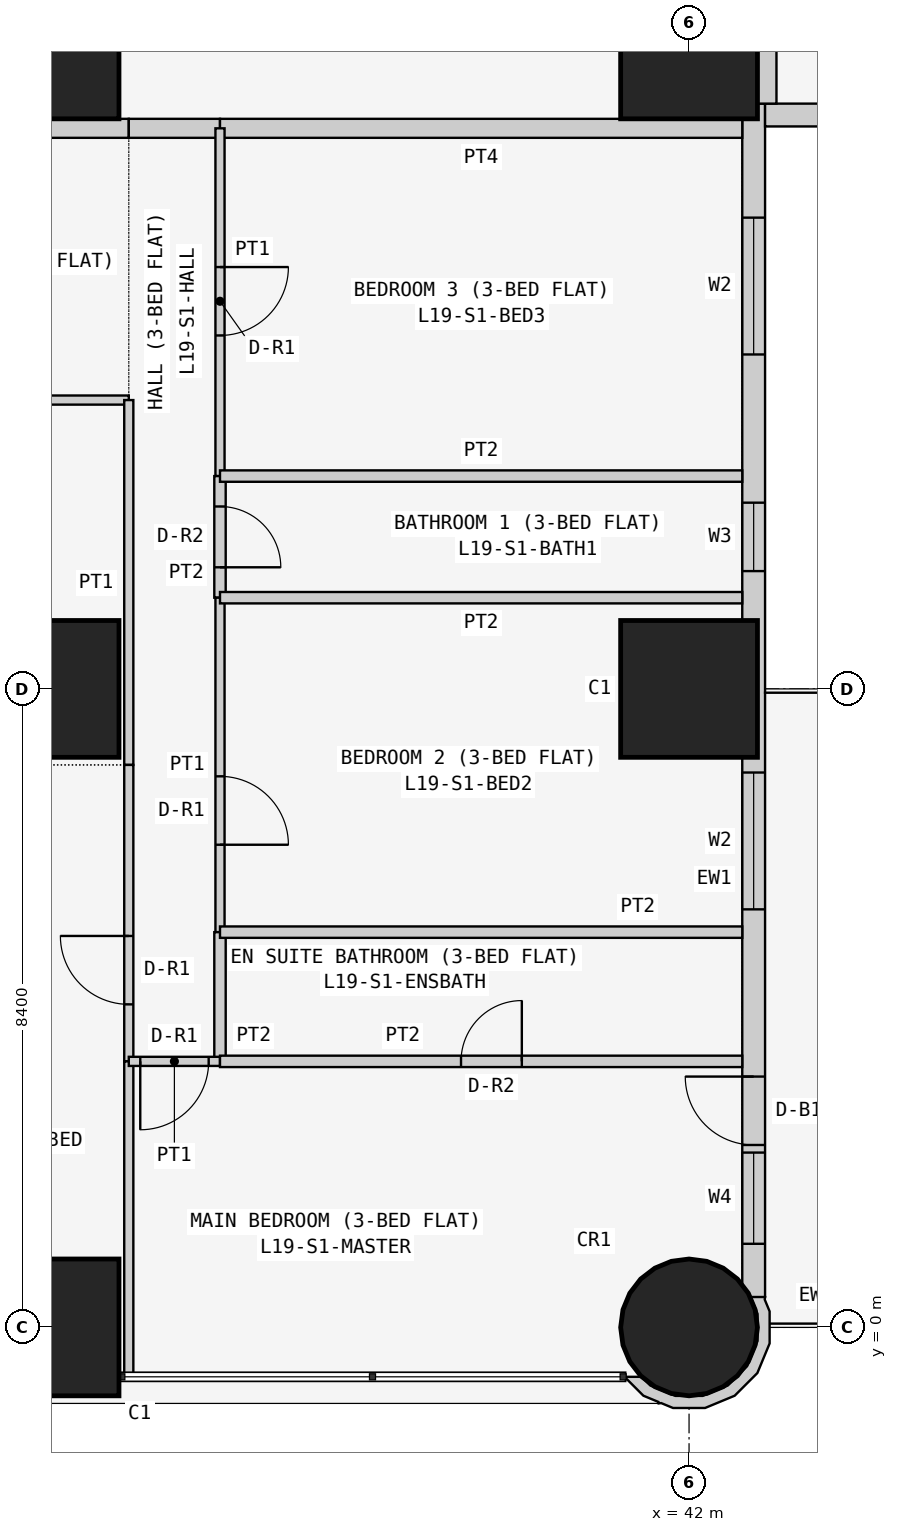
"""IFC4 building model, lengths in metres.
Left out: names, types, materials, properties, quantities, classifications, styles, units other than length and angle.
Written with IfcOpenShell. Run it as: python <this file> out.ifc"""

import sys

from ifc_helpers import new_model, si_unit, direction, frame, frame_2d, origin, origin_2d, place, context, subcontext, project, spatial, polyline, rectangle, circle, outline, extrude, element, fill, save


model = new_model("IFC4")
c1 = context("Model", 3, precision=1e-05, world=origin(), true_north=direction((0.0, 1.0)))
c2 = subcontext(c1, "Body", "Model", "MODEL_VIEW")
j1 = project(units=[si_unit("LENGTHUNIT", "METRE"), si_unit("PLANEANGLEUNIT", "RADIAN")], contexts=[c1])
p1 = place(None, origin())
s1 = spatial("IfcSite", under=j1, at=p1, CompositionType="ELEMENT")
p2 = place(p1, origin())
s2 = spatial("IfcBuilding", under=s1, at=p2, CompositionType="ELEMENT")
p3 = place(p2, frame((0.0, 0.0, 77.7)))
s3 = spatial("IfcBuildingStorey", under=s2, at=p3, CompositionType="ELEMENT", Elevation=77.7)
for number, where, z_axis, x_axis in (
    (1, (33.6, 0.0, 0.0), (0.0, 0.0, 1.0), (1.0, 0.0, 0.0)),
    (2, (33.6, 8.4, 0.0), (0.0, 0.0, 1.0), (1.0, 0.0, 0.0)),
    (3, (33.6, 16.8, 0.0), (0.0, 0.0, 1.0), (1.0, 0.0, 0.0)),
):
    element("IfcColumn", number, at=place(p3, frame(where, z_axis=z_axis, x_axis=x_axis)), inside=s3, PredefinedType="COLUMN", context=c2, shape_type="SweptSolid", body=[
        extrude(rectangle(XDim=1.8, YDim=1.8, at=origin_2d()), origin(), (0.0, 0.0, 1.0), 3.6),
    ])
p4 = place(p3, frame((42.0, 0.0, 0.0), z_axis=(0.0, 0.0, 1.0), x_axis=(1.0, 0.0, 0.0)))
e4 = element("IfcColumn", 4, at=p4, inside=s3, PredefinedType="COLUMN", context=c2, shape_type="SweptSolid", body=[
    extrude(circle(Radius=0.9, at=origin_2d()), origin(), (0.0, 0.0, 1.0), 3.6),
])
for number, where, z_axis, x_axis in (
    (5, (42.0, 8.4, 0.0), (0.0, 0.0, 1.0), (1.0, 0.0, 0.0)),
    (6, (42.0, 16.8, 0.0), (0.0, 0.0, 1.0), (1.0, 0.0, 0.0)),
):
    element("IfcColumn", number, at=place(p3, frame(where, z_axis=z_axis, x_axis=x_axis)), inside=s3, PredefinedType="COLUMN", context=c2, shape_type="SweptSolid", body=[
        extrude(rectangle(XDim=1.8, YDim=1.8, at=origin_2d()), origin(), (0.0, 0.0, 1.0), 3.6),
    ])
p5 = place(p3, frame((42.85, 0.4, 0.0), z_axis=(0.0, 0.0, 1.0), x_axis=(0.0, 1.0, 0.0)))
e7 = element("IfcWall", 7, at=p5, inside=s3, PredefinedType="SOLIDWALL", context=c2, shape_type="SweptSolid", body=[
    extrude(rectangle(XDim=15.7, YDim=0.3, at=frame_2d((7.85, 0.0))), origin(), (0.0, 0.0, 1.0), 3.45),
])
p6 = place(p5, frame((12.4, 0.0, 0.9)))
e8 = element("IfcOpeningElement", 8, at=p6, cuts=e7, PredefinedType="OPENING", context=c2, shape_type="SweptSolid", body=[
    extrude(rectangle(XDim=1.8, YDim=1.5, at=frame_2d((0.9, 0.75))), frame((0.0, 0.16, 0.0), z_axis=(0.0, -1.0, 0.0), x_axis=(1.0, 0.0, 0.0)), (0.0, 0.0, 1.0), 0.32),
])
p7 = place(p5, frame((9.55, 0.0, 1.5)))
e9 = element("IfcOpeningElement", 9, at=p7, cuts=e7, PredefinedType="OPENING", context=c2, shape_type="SweptSolid", body=[
    extrude(rectangle(XDim=0.9, YDim=0.7, at=frame_2d((0.45, 0.35))), frame((0.0, 0.16, 0.0), z_axis=(0.0, -1.0, 0.0), x_axis=(1.0, 0.0, 0.0)), (0.0, 0.0, 1.0), 0.32),
])
p8 = place(p5, frame((5.1, 0.0, 0.9)))
e10 = element("IfcOpeningElement", 10, at=p8, cuts=e7, PredefinedType="OPENING", context=c2, shape_type="SweptSolid", body=[
    extrude(rectangle(XDim=1.8, YDim=1.5, at=frame_2d((0.9, 0.75))), frame((0.0, 0.16, 0.0), z_axis=(0.0, -1.0, 0.0), x_axis=(1.0, 0.0, 0.0)), (0.0, 0.0, 1.0), 0.32),
])
p9 = place(p5, frame((2.0, 0.0, 0.0)))
e11 = element("IfcOpeningElement", 11, at=p9, cuts=e7, PredefinedType="OPENING", context=c2, shape_type="SweptSolid", body=[
    extrude(rectangle(XDim=0.9, YDim=2.4, at=frame_2d((0.45, 1.2))), frame((0.0, 0.16, 0.0), z_axis=(0.0, -1.0, 0.0), x_axis=(1.0, 0.0, 0.0)), (0.0, 0.0, 1.0), 0.32),
])
p10 = place(p5, frame((0.7, 0.0, 0.9)))
e12 = element("IfcOpeningElement", 12, at=p10, cuts=e7, PredefinedType="OPENING", context=c2, shape_type="SweptSolid", body=[
    extrude(rectangle(XDim=1.2, YDim=1.5, at=frame_2d((0.6, 0.75))), frame((0.0, 0.16, 0.0), z_axis=(0.0, -1.0, 0.0), x_axis=(1.0, 0.0, 0.0)), (0.0, 0.0, 1.0), 0.32),
])
p11 = place(p3, frame((43.0, 15.95, 0.0), z_axis=(0.0, 0.0, 1.0), x_axis=(1.0, 0.0, 0.0)))
e13 = element("IfcWall", 13, at=p11, inside=s3, PredefinedType="SOLIDWALL", context=c2, shape_type="SweptSolid", body=[
    extrude(rectangle(XDim=15.4, YDim=0.3, at=frame_2d((7.7, 0.0))), origin(), (0.0, 0.0, 1.0), 3.45),
])
p12 = place(p11, frame((1.2, 0.0, 0.9)))
e14 = element("IfcOpeningElement", 14, at=p12, cuts=e13, PredefinedType="OPENING", context=c2, shape_type="SweptSolid", body=[
    extrude(rectangle(XDim=1.8, YDim=1.5, at=frame_2d((0.9, 0.75))), frame((0.0, 0.16, 0.0), z_axis=(0.0, -1.0, 0.0), x_axis=(1.0, 0.0, 0.0)), (0.0, 0.0, 1.0), 0.32),
])
p13 = place(p11, frame((4.95, 0.0, 1.5)))
e15 = element("IfcOpeningElement", 15, at=p13, cuts=e13, PredefinedType="OPENING", context=c2, shape_type="SweptSolid", body=[
    extrude(rectangle(XDim=0.9, YDim=0.7, at=frame_2d((0.45, 0.35))), frame((0.0, 0.16, 0.0), z_axis=(0.0, -1.0, 0.0), x_axis=(1.0, 0.0, 0.0)), (0.0, 0.0, 1.0), 0.32),
])
p14 = place(p11, frame((8.5, 0.0, 0.9)))
e16 = element("IfcOpeningElement", 16, at=p14, cuts=e13, PredefinedType="OPENING", context=c2, shape_type="SweptSolid", body=[
    extrude(rectangle(XDim=1.8, YDim=1.5, at=frame_2d((0.9, 0.75))), frame((0.0, 0.16, 0.0), z_axis=(0.0, -1.0, 0.0), x_axis=(1.0, 0.0, 0.0)), (0.0, 0.0, 1.0), 0.32),
])
p15 = place(p11, frame((12.5, 0.0, 0.0)))
e17 = element("IfcOpeningElement", 17, at=p15, cuts=e13, PredefinedType="OPENING", context=c2, shape_type="SweptSolid", body=[
    extrude(rectangle(XDim=0.9, YDim=2.4, at=frame_2d((0.45, 1.2))), frame((0.0, 0.16, 0.0), z_axis=(0.0, -1.0, 0.0), x_axis=(1.0, 0.0, 0.0)), (0.0, 0.0, 1.0), 0.32),
])
p16 = place(p11, frame((13.5, 0.0, 0.9)))
e18 = element("IfcOpeningElement", 18, at=p16, cuts=e13, PredefinedType="OPENING", context=c2, shape_type="SweptSolid", body=[
    extrude(rectangle(XDim=1.2, YDim=1.5, at=frame_2d((0.6, 0.75))), frame((0.0, 0.16, 0.0), z_axis=(0.0, -1.0, 0.0), x_axis=(1.0, 0.0, 0.0)), (0.0, 0.0, 1.0), 0.32),
])
p17 = place(p3, frame((41.233, -0.611, 0.0), z_axis=(0.0, 0.0, 1.0), x_axis=(0.377204953059, -0.926129809145, 0.0)))
e19 = element("IfcWall", 19, at=p17, inside=s3, PredefinedType="SOLIDWALL", context=c2, shape_type="SweptSolid", body=[
    extrude(outline(polyline([(0.319, 1.843), (-0.072, 2.001), (-0.24, 2.001), (-0.269, 2.017), (-0.37, 1.841), (-0.102, 1.842), (0.23, 1.707), (0.485, 1.455), (0.624, 1.125), (0.626, 0.766), (0.49, 0.434), (0.239, 0.179), (0.09, 0.117), (0.011, -0.078), (0.024, -0.083), (0.33, 0.045), (0.48, 0.197), (0.499, 0.193), (0.508, 0.225), (0.626, 0.345), (0.785, 0.736), (0.782, 1.157), (0.619, 1.546), (0.319, 1.843)])), origin(), (0.0, 0.0, 1.0), 3.45),
])
p18 = place(p3, frame((43.025, 22.971, 0.0), z_axis=(0.0, 0.0, 1.0), x_axis=(0.0, -1.0, 0.0)))
e20 = element("IfcWall", 20, at=p18, inside=s3, PredefinedType="PARTITIONING", context=c2, shape_type="SweptSolid", body=[
    extrude(rectangle(XDim=6.871, YDim=0.25, at=frame_2d((3.436, 0.0))), origin(), (0.0, 0.0, 1.0), 3.45),
])
p19 = place(p3, frame((34.629, 15.775, 0.0), z_axis=(0.0, 0.0, 1.0), x_axis=(-1.0, 0.0, 0.0)))
e21 = element("IfcWall", 21, at=p19, inside=s3, PredefinedType="PARTITIONING", context=c2, shape_type="SweptSolid", body=[
    extrude(rectangle(XDim=5.229, YDim=0.25, at=frame_2d((2.615, 0.0))), origin(), (0.0, 0.0, 1.0), 3.45),
])
p20 = place(p19, frame((2.129, 0.0, 0.0)))
e22 = element("IfcOpeningElement", 22, at=p20, cuts=e21, PredefinedType="OPENING", context=c2, shape_type="SweptSolid", body=[
    extrude(rectangle(XDim=1.0, YDim=2.1, at=frame_2d((0.5, 1.05))), frame((0.0, 0.135, 0.0), z_axis=(0.0, -1.0, 0.0), x_axis=(1.0, 0.0, 0.0)), (0.0, 0.0, 1.0), 0.27),
])
p21 = place(p3, frame((35.829, 15.775, 0.0), z_axis=(0.0, 0.0, 1.0), x_axis=(-1.0, 0.0, 0.0)))
e23 = element("IfcWall", 23, at=p21, inside=s3, PredefinedType="PARTITIONING", context=c2, shape_type="SweptSolid", body=[
    extrude(rectangle(XDim=1.2, YDim=0.25, at=frame_2d((0.6, 0.0))), origin(), (0.0, 0.0, 1.0), 3.45),
])
p22 = place(p3, frame((42.7, 15.775, 0.0), z_axis=(0.0, 0.0, 1.0), x_axis=(-1.0, 0.0, 0.0)))
e24 = element("IfcWall", 24, at=p22, inside=s3, PredefinedType="PARTITIONING", context=c2, shape_type="SweptSolid", body=[
    extrude(rectangle(XDim=6.871, YDim=0.25, at=frame_2d((3.436, 0.0))), origin(), (0.0, 0.0, 1.0), 3.45),
])
p23 = place(p3, frame((29.4, 12.2, 0.0), z_axis=(0.0, 0.0, 1.0), x_axis=(1.0, 0.0, 0.0)))
e25 = element("IfcWall", 25, at=p23, inside=s3, PredefinedType="PARTITIONING", context=c2, shape_type="SweptSolid", body=[
    extrude(rectangle(XDim=5.229, YDim=0.12, at=frame_2d((2.615, 0.0))), origin(), (0.0, 0.0, 1.0), 3.45),
])
p24 = place(p23, frame((1.05, 0.0, 0.0)))
e26 = element("IfcOpeningElement", 26, at=p24, cuts=e25, PredefinedType="OPENING", context=c2, shape_type="SweptSolid", body=[
    extrude(rectangle(XDim=0.9, YDim=2.1, at=frame_2d((0.45, 1.05))), frame((0.0, 0.07, 0.0), z_axis=(0.0, -1.0, 0.0), x_axis=(1.0, 0.0, 0.0)), (0.0, 0.0, 1.0), 0.14),
])
p25 = place(p3, frame((34.629, 7.4, 0.0), z_axis=(0.0, 0.0, 1.0), x_axis=(0.0, 1.0, 0.0)))
e27 = element("IfcWall", 27, at=p25, inside=s3, PredefinedType="PARTITIONING", context=c2, shape_type="SweptSolid", body=[
    extrude(rectangle(XDim=4.8, YDim=0.12, at=frame_2d((2.4, 0.0))), origin(), (0.0, 0.0, 1.0), 3.45),
])
p26 = place(p3, frame((34.629, 3.5, 0.0), z_axis=(0.0, 0.0, 1.0), x_axis=(0.0, 1.0, 0.0)))
e28 = element("IfcWall", 28, at=p26, inside=s3, PredefinedType="PARTITIONING", context=c2, shape_type="SweptSolid", body=[
    extrude(rectangle(XDim=3.9, YDim=0.12, at=frame_2d((1.95, 0.0))), origin(), (0.0, 0.0, 1.0), 3.45),
])
p27 = place(p26, frame((0.75, 0.0, 0.0)))
e29 = element("IfcOpeningElement", 29, at=p27, cuts=e28, PredefinedType="OPENING", context=c2, shape_type="SweptSolid", body=[
    extrude(rectangle(XDim=0.9, YDim=2.1, at=frame_2d((0.45, 1.05))), frame((0.0, 0.07, 0.0), z_axis=(0.0, -1.0, 0.0), x_axis=(1.0, 0.0, 0.0)), (0.0, 0.0, 1.0), 0.14),
])
p28 = place(p3, frame((34.629, -0.65, 0.0), z_axis=(0.0, 0.0, 1.0), x_axis=(0.0, 1.0, 0.0)))
e30 = element("IfcWall", 30, at=p28, inside=s3, PredefinedType="PARTITIONING", context=c2, shape_type="SweptSolid", body=[
    extrude(rectangle(XDim=4.15, YDim=0.12, at=frame_2d((2.075, 0.0))), origin(), (0.0, 0.0, 1.0), 3.45),
])
p29 = place(p3, frame((35.829, 11.2, 0.0), z_axis=(0.0, 0.0, 1.0), x_axis=(0.0, 1.0, 0.0)))
e31 = element("IfcWall", 31, at=p29, inside=s3, PredefinedType="PARTITIONING", context=c2, shape_type="SweptSolid", body=[
    extrude(rectangle(XDim=4.575, YDim=0.12, at=frame_2d((2.288, 0.0))), origin(), (0.0, 0.0, 1.0), 3.45),
])
p30 = place(p29, frame((1.85, 0.0, 0.0)))
e32 = element("IfcOpeningElement", 32, at=p30, cuts=e31, PredefinedType="OPENING", context=c2, shape_type="SweptSolid", body=[
    extrude(rectangle(XDim=0.9, YDim=2.1, at=frame_2d((0.45, 1.05))), frame((0.0, 0.07, 0.0), z_axis=(0.0, -1.0, 0.0), x_axis=(1.0, 0.0, 0.0)), (0.0, 0.0, 1.0), 0.14),
])
p31 = place(p3, frame((35.829, 9.6, 0.0), z_axis=(0.0, 0.0, 1.0), x_axis=(0.0, 1.0, 0.0)))
e33 = element("IfcWall", 33, at=p31, inside=s3, PredefinedType="PARTITIONING", context=c2, shape_type="SweptSolid", body=[
    extrude(rectangle(XDim=1.6, YDim=0.15, at=frame_2d((0.8, 0.0))), origin(), (0.0, 0.0, 1.0), 3.45),
])
p32 = place(p31, frame((0.4, 0.0, 0.0)))
e34 = element("IfcOpeningElement", 34, at=p32, cuts=e33, PredefinedType="OPENING", context=c2, shape_type="SweptSolid", body=[
    extrude(rectangle(XDim=0.8, YDim=2.1, at=frame_2d((0.4, 1.05))), frame((0.0, 0.085, 0.0), z_axis=(0.0, -1.0, 0.0), x_axis=(1.0, 0.0, 0.0)), (0.0, 0.0, 1.0), 0.17),
])
p33 = place(p3, frame((35.829, 5.2, 0.0), z_axis=(0.0, 0.0, 1.0), x_axis=(0.0, 1.0, 0.0)))
e35 = element("IfcWall", 35, at=p33, inside=s3, PredefinedType="PARTITIONING", context=c2, shape_type="SweptSolid", body=[
    extrude(rectangle(XDim=4.4, YDim=0.12, at=frame_2d((2.2, 0.0))), origin(), (0.0, 0.0, 1.0), 3.45),
])
p34 = place(p33, frame((1.15, 0.0, 0.0)))
e36 = element("IfcOpeningElement", 36, at=p34, cuts=e35, PredefinedType="OPENING", context=c2, shape_type="SweptSolid", body=[
    extrude(rectangle(XDim=0.9, YDim=2.1, at=frame_2d((0.45, 1.05))), frame((0.0, 0.07, 0.0), z_axis=(0.0, -1.0, 0.0), x_axis=(1.0, 0.0, 0.0)), (0.0, 0.0, 1.0), 0.14),
])
p35 = place(p3, frame((35.829, 3.5, 0.0), z_axis=(0.0, 0.0, 1.0), x_axis=(0.0, 1.0, 0.0)))
e37 = element("IfcWall", 37, at=p35, inside=s3, PredefinedType="PARTITIONING", context=c2, shape_type="SweptSolid", body=[
    extrude(rectangle(XDim=1.7, YDim=0.15, at=frame_2d((0.85, 0.0))), origin(), (0.0, 0.0, 1.0), 3.45),
])
p36 = place(p3, frame((34.629, 3.5, 0.0), z_axis=(0.0, 0.0, 1.0), x_axis=(1.0, 0.0, 0.0)))
e38 = element("IfcWall", 38, at=p36, inside=s3, PredefinedType="PARTITIONING", context=c2, shape_type="SweptSolid", body=[
    extrude(rectangle(XDim=1.2, YDim=0.12, at=frame_2d((0.6, 0.0))), origin(), (0.0, 0.0, 1.0), 3.45),
])
p37 = place(p36, frame((0.151, 0.0, 0.0)))
e39 = element("IfcOpeningElement", 39, at=p37, cuts=e38, PredefinedType="OPENING", context=c2, shape_type="SweptSolid", body=[
    extrude(rectangle(XDim=0.9, YDim=2.1, at=frame_2d((0.45, 1.05))), frame((0.0, 0.07, 0.0), z_axis=(0.0, -1.0, 0.0), x_axis=(1.0, 0.0, 0.0)), (0.0, 0.0, 1.0), 0.14),
])
for number, where, z_axis, x_axis in (
    (40, (35.829, 11.2, 0.0), (0.0, 0.0, 1.0), (1.0, 0.0, 0.0)),
    (41, (35.829, 9.6, 0.0), (0.0, 0.0, 1.0), (1.0, 0.0, 0.0)),
    (42, (35.829, 5.2, 0.0), (0.0, 0.0, 1.0), (1.0, 0.0, 0.0)),
):
    element("IfcWall", number, at=place(p3, frame(where, z_axis=z_axis, x_axis=x_axis)), inside=s3, PredefinedType="PARTITIONING", context=c2, shape_type="SweptSolid", body=[
        extrude(rectangle(XDim=6.871, YDim=0.15, at=frame_2d((3.436, 0.0))), origin(), (0.0, 0.0, 1.0), 3.45),
    ])
p38 = place(p3, frame((35.829, 3.5, 0.0), z_axis=(0.0, 0.0, 1.0), x_axis=(1.0, 0.0, 0.0)))
e43 = element("IfcWall", 43, at=p38, inside=s3, PredefinedType="PARTITIONING", context=c2, shape_type="SweptSolid", body=[
    extrude(rectangle(XDim=6.871, YDim=0.15, at=frame_2d((3.436, 0.0))), origin(), (0.0, 0.0, 1.0), 3.45),
])
p39 = place(p38, frame((3.171, 0.0, 0.0)))
e44 = element("IfcOpeningElement", 44, at=p39, cuts=e43, PredefinedType="OPENING", context=c2, shape_type="SweptSolid", body=[
    extrude(rectangle(XDim=0.8, YDim=2.1, at=frame_2d((0.4, 1.05))), frame((0.0, 0.085, 0.0), z_axis=(0.0, -1.0, 0.0), x_axis=(1.0, 0.0, 0.0)), (0.0, 0.0, 1.0), 0.17),
])
p40 = place(p6, origin())
e45 = element("IfcWindow", 45, at=p40, inside=s3, PartitioningType="SINGLE_PANEL", PredefinedType="WINDOW", context=c2, shape_type="SweptSolid", body=[
    extrude(rectangle(XDim=1.8, YDim=1.5, at=frame_2d((0.9, 0.75))), frame((0.0, 0.03, 0.0), z_axis=(0.0, -1.0, 0.0), x_axis=(1.0, 0.0, 0.0)), (0.0, 0.0, 1.0), 0.06),
])
fill(e8, e45)
p41 = place(p7, origin())
e46 = element("IfcWindow", 46, at=p41, inside=s3, PartitioningType="SINGLE_PANEL", PredefinedType="WINDOW", context=c2, shape_type="SweptSolid", body=[
    extrude(rectangle(XDim=0.9, YDim=0.7, at=frame_2d((0.45, 0.35))), frame((0.0, 0.03, 0.0), z_axis=(0.0, -1.0, 0.0), x_axis=(1.0, 0.0, 0.0)), (0.0, 0.0, 1.0), 0.06),
])
fill(e9, e46)
p42 = place(p8, origin())
e47 = element("IfcWindow", 47, at=p42, inside=s3, PartitioningType="SINGLE_PANEL", PredefinedType="WINDOW", context=c2, shape_type="SweptSolid", body=[
    extrude(rectangle(XDim=1.8, YDim=1.5, at=frame_2d((0.9, 0.75))), frame((0.0, 0.03, 0.0), z_axis=(0.0, -1.0, 0.0), x_axis=(1.0, 0.0, 0.0)), (0.0, 0.0, 1.0), 0.06),
])
fill(e10, e47)
p43 = place(p9, origin())
e48 = element("IfcDoor", 48, at=p43, inside=s3, OperationType="SINGLE_SWING_RIGHT", PredefinedType="DOOR", context=c2, shape_type="SweptSolid", body=[
    extrude(rectangle(XDim=0.9, YDim=2.4, at=frame_2d((0.45, 1.2))), frame((0.0, 0.025, 0.0), z_axis=(0.0, -1.0, 0.0), x_axis=(1.0, 0.0, 0.0)), (0.0, 0.0, 1.0), 0.05),
])
fill(e11, e48)
p44 = place(p10, origin())
e49 = element("IfcWindow", 49, at=p44, inside=s3, PartitioningType="SINGLE_PANEL", PredefinedType="WINDOW", context=c2, shape_type="SweptSolid", body=[
    extrude(rectangle(XDim=1.2, YDim=1.5, at=frame_2d((0.6, 0.75))), frame((0.0, 0.03, 0.0), z_axis=(0.0, -1.0, 0.0), x_axis=(1.0, 0.0, 0.0)), (0.0, 0.0, 1.0), 0.06),
])
fill(e12, e49)
p45 = place(p27, origin())
e50 = element("IfcDoor", 50, at=p45, inside=s3, OperationType="SINGLE_SWING_RIGHT", PredefinedType="DOOR", context=c2, shape_type="SweptSolid", body=[
    extrude(rectangle(XDim=0.9, YDim=2.1, at=frame_2d((0.45, 1.05))), frame((0.0, 0.025, 0.0), z_axis=(0.0, -1.0, 0.0), x_axis=(1.0, 0.0, 0.0)), (0.0, 0.0, 1.0), 0.05),
])
fill(e29, e50)
p46 = place(p30, frame((0.9, 0.0, 0.0), z_axis=(0.0, 0.0, 1.0), x_axis=(-1.0, 0.0, 0.0)))
e51 = element("IfcDoor", 51, at=p46, inside=s3, OperationType="SINGLE_SWING_LEFT", PredefinedType="DOOR", context=c2, shape_type="SweptSolid", body=[
    extrude(rectangle(XDim=0.9, YDim=2.1, at=frame_2d((0.45, 1.05))), frame((0.0, 0.025, 0.0), z_axis=(0.0, -1.0, 0.0), x_axis=(1.0, 0.0, 0.0)), (0.0, 0.0, 1.0), 0.05),
])
fill(e32, e51)
p47 = place(p32, frame((0.8, 0.0, 0.0), z_axis=(0.0, 0.0, 1.0), x_axis=(-1.0, 0.0, 0.0)))
e52 = element("IfcDoor", 52, at=p47, inside=s3, OperationType="SINGLE_SWING_RIGHT", PredefinedType="DOOR", context=c2, shape_type="SweptSolid", body=[
    extrude(rectangle(XDim=0.8, YDim=2.1, at=frame_2d((0.4, 1.05))), frame((0.0, 0.025, 0.0), z_axis=(0.0, -1.0, 0.0), x_axis=(1.0, 0.0, 0.0)), (0.0, 0.0, 1.0), 0.05),
])
fill(e34, e52)
p48 = place(p34, frame((0.9, 0.0, 0.0), z_axis=(0.0, 0.0, 1.0), x_axis=(-1.0, 0.0, 0.0)))
e53 = element("IfcDoor", 53, at=p48, inside=s3, OperationType="SINGLE_SWING_RIGHT", PredefinedType="DOOR", context=c2, shape_type="SweptSolid", body=[
    extrude(rectangle(XDim=0.9, YDim=2.1, at=frame_2d((0.45, 1.05))), frame((0.0, 0.025, 0.0), z_axis=(0.0, -1.0, 0.0), x_axis=(1.0, 0.0, 0.0)), (0.0, 0.0, 1.0), 0.05),
])
fill(e36, e53)
p49 = place(p37, frame((0.9, 0.0, 0.0), z_axis=(0.0, 0.0, 1.0), x_axis=(-1.0, 0.0, 0.0)))
e54 = element("IfcDoor", 54, at=p49, inside=s3, OperationType="SINGLE_SWING_RIGHT", PredefinedType="DOOR", context=c2, shape_type="SweptSolid", body=[
    extrude(rectangle(XDim=0.9, YDim=2.1, at=frame_2d((0.45, 1.05))), frame((0.0, 0.025, 0.0), z_axis=(0.0, -1.0, 0.0), x_axis=(1.0, 0.0, 0.0)), (0.0, 0.0, 1.0), 0.05),
])
fill(e39, e54)
p50 = place(p39, origin())
e55 = element("IfcDoor", 55, at=p50, inside=s3, OperationType="SINGLE_SWING_RIGHT", PredefinedType="DOOR", context=c2, shape_type="SweptSolid", body=[
    extrude(rectangle(XDim=0.8, YDim=2.1, at=frame_2d((0.4, 1.05))), frame((0.0, 0.025, 0.0), z_axis=(0.0, -1.0, 0.0), x_axis=(1.0, 0.0, 0.0)), (0.0, 0.0, 1.0), 0.05),
])
fill(e44, e55)
save(model, sys.argv[1])
